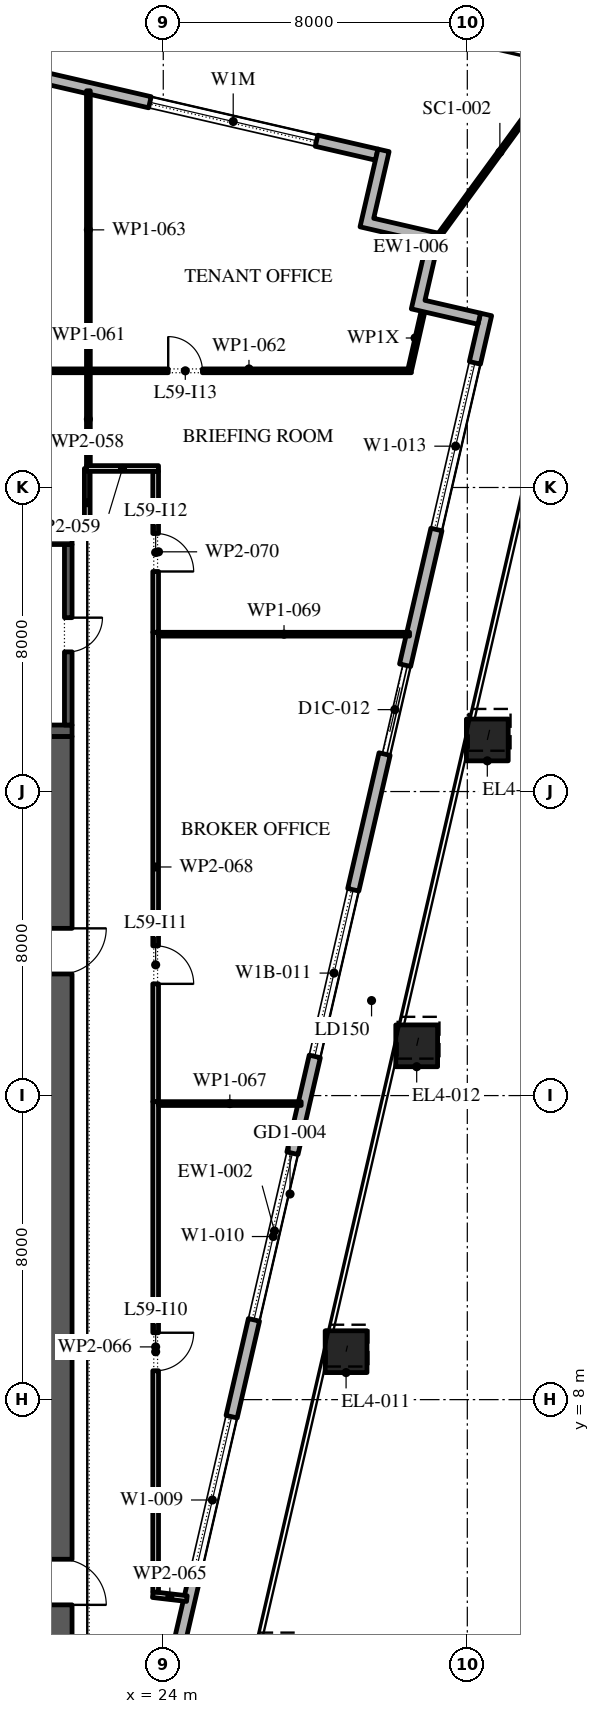
"""IFC4 building model, lengths in metres.
Left out: names, types, materials, properties, quantities, classifications, styles, units other than length and angle.
Written with IfcOpenShell. Run it as: python <this file> out.ifc"""

import sys

from ifc_helpers import new_model, si_unit, direction, frame, frame_2d, origin, origin_2d, place, context, subcontext, project, spatial, polyline, rectangle, outline, extrude, element, fill, save


model = new_model("IFC4")
c1 = context("Model", 3, precision=1e-05, world=origin(), true_north=direction((0.0, 1.0)))
c2 = subcontext(c1, "Body", "Model", "MODEL_VIEW")
j1 = project(units=[si_unit("LENGTHUNIT", "METRE"), si_unit("PLANEANGLEUNIT", "RADIAN")], contexts=[c1])
p1 = place(None, origin())
s1 = spatial("IfcSite", under=j1, at=p1, CompositionType="ELEMENT")
p2 = place(p1, origin())
s2 = spatial("IfcBuilding", under=s1, at=p2, CompositionType="ELEMENT")
p3 = place(p2, frame((0.0, 0.0, 272.4)))
s3 = spatial("IfcBuildingStorey", under=s2, at=p3, CompositionType="ELEMENT", Elevation=272.4)
p4 = place(p3, frame((26.952, 1.213, 0.0), z_axis=(0.005868742296, 0.025334372683, 0.999661806525), x_axis=(-0.974202561131, 0.225675363932, 0.0)))
e1 = element("IfcColumn", 1, at=p4, inside=s3, PredefinedType="COLUMN", context=c2, shape_type="SweptSolid", body=[
    extrude(rectangle(XDim=1.1, YDim=1.1, at=origin_2d()), origin(), (0.0, 0.0, 1.0), 4.202),
])
p5 = place(p3, frame((28.81, 9.262, 0.0), z_axis=(0.008712317294, 0.037869539172, 0.999244711535), x_axis=(-0.974542124643, 0.224204476528, 0.0)))
e2 = element("IfcColumn", 2, at=p5, inside=s3, PredefinedType="COLUMN", context=c2, shape_type="SweptSolid", body=[
    extrude(rectangle(XDim=1.1, YDim=1.1, at=origin_2d()), origin(), (0.0, 0.0, 1.0), 4.203),
])
p6 = place(p3, frame((30.668, 17.31, 0.0), z_axis=(0.011667590749, 0.050559559912, 0.998652891764), x_axis=(-0.974391195695, 0.224859506699, 0.0)))
e3 = element("IfcColumn", 3, at=p6, inside=s3, PredefinedType="COLUMN", context=c2, shape_type="SweptSolid", body=[
    extrude(rectangle(XDim=1.1, YDim=1.1, at=origin_2d()), origin(), (0.0, 0.0, 1.0), 4.206),
])
p7 = place(p3, frame((32.526, 25.358, 0.0), z_axis=(0.014558999143, 0.063108330945, 0.997900483069), x_axis=(-0.97440628778, 0.224794097641, 0.0)))
e4 = element("IfcColumn", 4, at=p7, inside=s3, PredefinedType="COLUMN", context=c2, shape_type="SweptSolid", body=[
    extrude(rectangle(XDim=1.1, YDim=1.1, at=origin_2d()), origin(), (0.0, 0.0, 1.0), 4.209),
])
p8 = place(p3, frame((21.359, -11.678, 0.0), z_axis=(0.0, 0.0, 1.0), x_axis=(0.224949198343, 0.974370493275, 0.0)))
e5 = element("IfcWall", 5, at=p8, inside=s3, PredefinedType="STANDARD", context=c2, shape_type="SweptSolid", body=[
    extrude(rectangle(XDim=49.5, YDim=0.3, at=frame_2d((24.75, 0.0))), origin(), (0.0, 0.0, 1.0), 4.0),
])
p9 = place(p8, frame((1.157, 0.0, 0.45)))
e6 = element("IfcOpeningElement", 6, at=p9, cuts=e5, PredefinedType="OPENING", context=c2, shape_type="SweptSolid", body=[
    extrude(rectangle(XDim=4.5, YDim=3.05, at=frame_2d((2.25, 1.525))), frame((0.0, 0.16, 0.0), z_axis=(0.0, -1.0, 0.0), x_axis=(1.0, 0.0, 0.0)), (0.0, 0.0, 1.0), 0.32),
])
p10 = place(p8, frame((8.121, 0.0, 0.45)))
e7 = element("IfcOpeningElement", 7, at=p10, cuts=e5, PredefinedType="OPENING", context=c2, shape_type="SweptSolid", body=[
    extrude(rectangle(XDim=4.5, YDim=3.05, at=frame_2d((2.25, 1.525))), frame((0.0, 0.16, 0.0), z_axis=(0.0, -1.0, 0.0), x_axis=(1.0, 0.0, 0.0)), (0.0, 0.0, 1.0), 0.32),
])
p11 = place(p8, frame((15.236, 0.0, 0.45)))
e8 = element("IfcOpeningElement", 8, at=p11, cuts=e5, PredefinedType="OPENING", context=c2, shape_type="SweptSolid", body=[
    extrude(rectangle(XDim=4.5, YDim=3.05, at=frame_2d((2.25, 1.525))), frame((0.0, 0.16, 0.0), z_axis=(0.0, -1.0, 0.0), x_axis=(1.0, 0.0, 0.0)), (0.0, 0.0, 1.0), 0.32),
])
p12 = place(p8, frame((22.35, 0.0, 0.45)))
e9 = element("IfcOpeningElement", 9, at=p12, cuts=e5, PredefinedType="OPENING", context=c2, shape_type="SweptSolid", body=[
    extrude(rectangle(XDim=4.5, YDim=3.05, at=frame_2d((2.25, 1.525))), frame((0.0, 0.16, 0.0), z_axis=(0.0, -1.0, 0.0), x_axis=(1.0, 0.0, 0.0)), (0.0, 0.0, 1.0), 0.32),
])
p13 = place(p8, frame((29.464, 0.0, 0.45)))
e10 = element("IfcOpeningElement", 10, at=p13, cuts=e5, PredefinedType="OPENING", context=c2, shape_type="SweptSolid", body=[
    extrude(rectangle(XDim=4.5, YDim=2.95, at=frame_2d((2.25, 1.475))), frame((0.0, 0.16, 0.0), z_axis=(0.0, -1.0, 0.0), x_axis=(1.0, 0.0, 0.0)), (0.0, 0.0, 1.0), 0.32),
])
p14 = place(p8, frame((37.628, 0.0, 0.0)))
e11 = element("IfcOpeningElement", 11, at=p14, cuts=e5, PredefinedType="OPENING", context=c2, shape_type="SweptSolid", body=[
    extrude(rectangle(XDim=2.4, YDim=3.325, at=frame_2d((1.2, 1.663))), frame((0.0, 0.16, 0.0), z_axis=(0.0, -1.0, 0.0), x_axis=(1.0, 0.0, 0.0)), (0.0, 0.0, 1.0), 0.32),
])
p15 = place(p8, frame((43.693, 0.0, 0.45)))
e12 = element("IfcOpeningElement", 12, at=p15, cuts=e5, PredefinedType="OPENING", context=c2, shape_type="SweptSolid", body=[
    extrude(rectangle(XDim=4.5, YDim=3.05, at=frame_2d((2.25, 1.525))), frame((0.0, 0.16, 0.0), z_axis=(0.0, -1.0, 0.0), x_axis=(1.0, 0.0, 0.0)), (0.0, 0.0, 1.0), 0.32),
])
p16 = place(p3, frame((29.616, 40.758, 0.0), z_axis=(0.0, 0.0, 1.0), x_axis=(-0.974370532314, 0.224949029246, 0.0)))
e13 = element("IfcWall", 13, at=p16, inside=s3, PredefinedType="STANDARD", context=c2, shape_type="SweptSolid", body=[
    extrude(rectangle(XDim=48.0, YDim=0.3, at=frame_2d((24.0, 0.0))), origin(), (0.0, 0.0, 1.0), 4.0),
])
p17 = place(p16, frame((1.625, 0.0, 0.45)))
e14 = element("IfcOpeningElement", 14, at=p17, cuts=e13, PredefinedType="OPENING", context=c2, shape_type="SweptSolid", body=[
    extrude(rectangle(XDim=4.5, YDim=2.575, at=frame_2d((2.25, 1.288))), frame((0.0, 0.16, 0.0), z_axis=(0.0, -1.0, 0.0), x_axis=(1.0, 0.0, 0.0)), (0.0, 0.0, 1.0), 0.32),
])
p18 = place(p16, frame((10.575, 0.0, 0.0)))
e15 = element("IfcOpeningElement", 15, at=p18, cuts=e13, PredefinedType="OPENING", context=c2, shape_type="SweptSolid", body=[
    extrude(rectangle(XDim=2.4, YDim=3.5, at=frame_2d((1.2, 1.75))), frame((0.0, 0.16, 0.0), z_axis=(0.0, -1.0, 0.0), x_axis=(1.0, 0.0, 0.0)), (0.0, 0.0, 1.0), 0.32),
])
p19 = place(p16, frame((17.575, 0.0, 0.45)))
e16 = element("IfcOpeningElement", 16, at=p19, cuts=e13, PredefinedType="OPENING", context=c2, shape_type="SweptSolid", body=[
    extrude(rectangle(XDim=4.5, YDim=2.45, at=frame_2d((2.25, 1.225))), frame((0.0, 0.16, 0.0), z_axis=(0.0, -1.0, 0.0), x_axis=(1.0, 0.0, 0.0)), (0.0, 0.0, 1.0), 0.32),
])
p20 = place(p16, frame((25.625, 0.0, 0.45)))
e17 = element("IfcOpeningElement", 17, at=p20, cuts=e13, PredefinedType="OPENING", context=c2, shape_type="SweptSolid", body=[
    extrude(rectangle(XDim=4.5, YDim=2.45, at=frame_2d((2.25, 1.225))), frame((0.0, 0.16, 0.0), z_axis=(0.0, -1.0, 0.0), x_axis=(1.0, 0.0, 0.0)), (0.0, 0.0, 1.0), 0.32),
])
p21 = place(p16, frame((33.675, 0.0, 0.45)))
e18 = element("IfcOpeningElement", 18, at=p21, cuts=e13, PredefinedType="OPENING", context=c2, shape_type="SweptSolid", body=[
    extrude(rectangle(XDim=4.5, YDim=2.45, at=frame_2d((2.25, 1.225))), frame((0.0, 0.16, 0.0), z_axis=(0.0, -1.0, 0.0), x_axis=(1.0, 0.0, 0.0)), (0.0, 0.0, 1.0), 0.32),
])
p22 = place(p16, frame((42.175, 0.0, 0.0)))
e19 = element("IfcOpeningElement", 19, at=p22, cuts=e13, PredefinedType="OPENING", context=c2, shape_type="SweptSolid", body=[
    extrude(rectangle(XDim=2.4, YDim=3.5, at=frame_2d((1.2, 1.75))), frame((0.0, 0.16, 0.0), z_axis=(0.0, -1.0, 0.0), x_axis=(1.0, 0.0, 0.0)), (0.0, 0.0, 1.0), 0.32),
])
p23 = place(p3, origin())
e20 = element("IfcWall", 20, at=p23, inside=s3, PredefinedType="STANDARD", context=c2, shape_type="SweptSolid", body=[
    extrude(outline(polyline([(30.931, 38.453), (29.177, 38.858), (29.65, 40.905), (29.942, 40.837), (29.537, 39.083), (31.291, 38.678), (30.886, 36.924), (32.348, 36.587), (32.28, 36.295), (30.526, 36.699), (30.931, 38.453)])), origin(), (0.0, 0.0, 1.0), 4.0),
])
p24 = place(p3, frame((31.291, 38.678, -0.05), z_axis=(0.0, 0.0, 1.0), x_axis=(0.589676569324, 0.807639488627, 0.0)))
e21 = element("IfcWall", 21, at=p24, inside=s3, PredefinedType="STANDARD", context=c2, shape_type="SweptSolid", body=[
    extrude(rectangle(XDim=5.312, YDim=0.1, at=frame_2d((2.656, 0.0))), origin(), (0.0, 0.0, 1.0), 4.05),
])
p25 = place(p3, frame((21.3, -2.45, 0.0), z_axis=(0.0, 0.0, 1.0), x_axis=(0.0, 1.0, 0.0)))
e22 = element("IfcWall", 22, at=p25, inside=s3, PredefinedType="SHEAR", context=c2, shape_type="SweptSolid", body=[
    extrude(rectangle(XDim=27.9, YDim=0.6, at=frame_2d((13.95, 0.0))), origin(), (0.0, 0.0, 1.0), 4.0),
])
p26 = place(p25, frame((5.05, 0.0, 0.0)))
e23 = element("IfcOpeningElement", 23, at=p26, cuts=e22, PredefinedType="OPENING", context=c2, shape_type="SweptSolid", body=[
    extrude(rectangle(XDim=1.2, YDim=2.1, at=frame_2d((0.6, 1.05))), frame((0.0, 0.31, 0.0), z_axis=(0.0, -1.0, 0.0), x_axis=(1.0, 0.0, 0.0)), (0.0, 0.0, 1.0), 0.62),
])
p27 = place(p25, frame((21.65, 0.0, 0.0)))
e24 = element("IfcOpeningElement", 24, at=p27, cuts=e22, PredefinedType="OPENING", context=c2, shape_type="SweptSolid", body=[
    extrude(rectangle(XDim=1.2, YDim=2.1, at=frame_2d((0.6, 1.05))), frame((0.0, 0.31, 0.0), z_axis=(0.0, -1.0, 0.0), x_axis=(1.0, 0.0, 0.0)), (0.0, 0.0, 1.0), 0.62),
])
p28 = place(p3, frame((10.4, 25.6, 0.0), z_axis=(0.0, 0.0, 1.0), x_axis=(1.0, 0.0, 0.0)))
e25 = element("IfcWall", 25, at=p28, inside=s3, PredefinedType="SHEAR", context=c2, shape_type="SweptSolid", body=[
    extrude(rectangle(XDim=11.2, YDim=0.3, at=frame_2d((5.6, 0.0))), origin(), (0.0, 0.0, 1.0), 4.0),
])
p29 = place(p3, frame((21.5, 25.75, 0.0), z_axis=(0.0, 0.0, 1.0), x_axis=(0.0, 1.0, 0.0)))
e26 = element("IfcWall", 26, at=p29, inside=s3, PredefinedType="SHEAR", context=c2, shape_type="SweptSolid", body=[
    extrude(rectangle(XDim=4.75, YDim=0.2, at=frame_2d((2.375, 0.0))), origin(), (0.0, 0.0, 1.0), 4.0),
])
p30 = place(p29, frame((1.925, 0.0, 0.0)))
e27 = element("IfcOpeningElement", 27, at=p30, cuts=e26, PredefinedType="OPENING", context=c2, shape_type="SweptSolid", body=[
    extrude(rectangle(XDim=0.9, YDim=2.1, at=frame_2d((0.45, 1.05))), frame((0.0, 0.11, 0.0), z_axis=(0.0, -1.0, 0.0), x_axis=(1.0, 0.0, 0.0)), (0.0, 0.0, 1.0), 0.22),
])
p31 = place(p3, frame((10.4, 30.6, 0.0), z_axis=(0.0, 0.0, 1.0), x_axis=(1.0, 0.0, 0.0)))
e28 = element("IfcWall", 28, at=p31, inside=s3, PredefinedType="SHEAR", context=c2, shape_type="SweptSolid", body=[
    extrude(rectangle(XDim=11.2, YDim=0.2, at=frame_2d((5.6, 0.0))), origin(), (0.0, 0.0, 1.0), 4.0),
])
p32 = place(p3, frame((22.0, 30.7, 0.0), z_axis=(0.0, 0.0, 1.0), x_axis=(0.0, 1.0, 0.0)))
e29 = element("IfcWall", 29, at=p32, inside=s3, PredefinedType="PARTITIONING", context=c2, shape_type="SweptSolid", body=[
    extrude(rectangle(XDim=1.8, YDim=0.15, at=frame_2d((0.9, 0.0))), origin(), (0.0, 0.0, 1.0), 4.0),
])
p33 = place(p3, frame((21.98, 32.5, 0.0), z_axis=(0.0, 0.0, 1.0), x_axis=(1.0, 0.0, 0.0)))
e30 = element("IfcWall", 30, at=p33, inside=s3, PredefinedType="PARTITIONING", context=c2, shape_type="SweptSolid", body=[
    extrude(rectangle(XDim=1.895, YDim=0.15, at=frame_2d((0.948, 0.0))), origin(), (0.0, 0.0, 1.0), 4.0),
])
p34 = place(p3, frame((21.98, 35.07, 0.0), z_axis=(0.0, 0.0, 1.0), x_axis=(-1.0, 0.0, 0.0)))
e31 = element("IfcWall", 31, at=p34, inside=s3, PredefinedType="PARTITIONING", context=c2, shape_type="SweptSolid", body=[
    extrude(rectangle(XDim=7.79, YDim=0.1, at=frame_2d((3.895, 0.0))), origin(), (0.0, 0.0, 1.0), 4.0),
])
p35 = place(p3, frame((22.03, 35.02, 0.0), z_axis=(0.0, 0.0, 1.0), x_axis=(0.0, -1.0, 0.0)))
e32 = element("IfcWall", 32, at=p35, inside=s3, PredefinedType="PARTITIONING", context=c2, shape_type="SweptSolid", body=[
    extrude(rectangle(XDim=2.445, YDim=0.1, at=frame_2d((1.223, 0.0))), origin(), (0.0, 0.0, 1.0), 4.0),
])
p36 = place(p3, frame((21.98, 35.07, 0.0), z_axis=(0.0, 0.0, 1.0), x_axis=(1.0, 0.0, 0.0)))
e33 = element("IfcWall", 33, at=p36, inside=s3, PredefinedType="PARTITIONING", context=c2, shape_type="SweptSolid", body=[
    extrude(rectangle(XDim=8.55, YDim=0.1, at=frame_2d((4.275, 0.0))), origin(), (0.0, 0.0, 1.0), 4.0),
])
p37 = place(p36, frame((2.15, 0.0, 0.0)))
e34 = element("IfcOpeningElement", 34, at=p37, cuts=e33, PredefinedType="OPENING", context=c2, shape_type="SweptSolid", body=[
    extrude(rectangle(XDim=0.9, YDim=2.1, at=frame_2d((0.45, 1.05))), frame((0.0, 0.06, 0.0), z_axis=(0.0, -1.0, 0.0), x_axis=(1.0, 0.0, 0.0)), (0.0, 0.0, 1.0), 0.12),
])
p38 = place(p3, frame((22.03, 42.438, 0.0), z_axis=(0.0, 0.0, 1.0), x_axis=(0.0, -1.0, 0.0)))
e35 = element("IfcWall", 35, at=p38, inside=s3, PredefinedType="PARTITIONING", context=c2, shape_type="SweptSolid", body=[
    extrude(rectangle(XDim=7.318, YDim=0.1, at=frame_2d((3.659, 0.0))), origin(), (0.0, 0.0, 1.0), 4.0),
])
p39 = place(p3, frame((23.725, 2.869, 0.0), z_axis=(0.0, 0.0, 1.0), x_axis=(0.993330469257, -0.115302119865, 0.0)))
e36 = element("IfcWall", 36, at=p39, inside=s3, PredefinedType="PARTITIONING", context=c2, shape_type="SweptSolid", body=[
    extrude(rectangle(XDim=0.902, YDim=0.15, at=frame_2d((0.451, 0.0))), origin(), (0.0, 0.0, 1.0), 4.0),
])
p40 = place(p3, frame((23.8, 15.84, 0.0), z_axis=(0.0, 0.0, 1.0), x_axis=(0.0, -1.0, 0.0)))
e37 = element("IfcWall", 37, at=p40, inside=s3, PredefinedType="PARTITIONING", context=c2, shape_type="SweptSolid", body=[
    extrude(rectangle(XDim=12.905, YDim=0.15, at=frame_2d((6.453, 0.0))), origin(), (0.0, 0.0, 1.0), 4.0),
])
p41 = place(p40, frame((6.08, 0.0, 0.0)))
e38 = element("IfcOpeningElement", 38, at=p41, cuts=e37, PredefinedType="OPENING", context=c2, shape_type="SweptSolid", body=[
    extrude(rectangle(XDim=1.0, YDim=2.1, at=frame_2d((0.5, 1.05))), frame((0.0, 0.085, 0.0), z_axis=(0.0, -1.0, 0.0), x_axis=(1.0, 0.0, 0.0)), (0.0, 0.0, 1.0), 0.17),
])
p42 = place(p3, frame((23.875, 15.79, 0.0), z_axis=(0.0, 0.0, 1.0), x_axis=(1.0, 0.0, 0.0)))
e39 = element("IfcWall", 39, at=p42, inside=s3, PredefinedType="PARTITIONING", context=c2, shape_type="SweptSolid", body=[
    extrude(rectangle(XDim=3.754, YDim=0.1, at=frame_2d((1.877, 0.0))), origin(), (0.0, 0.0, 1.0), 4.0),
])
p43 = place(p3, frame((23.8, 28.19, 0.0), z_axis=(0.0, 0.0, 1.0), x_axis=(0.0, -1.0, 0.0)))
e40 = element("IfcWall", 40, at=p43, inside=s3, PredefinedType="PARTITIONING", context=c2, shape_type="SweptSolid", body=[
    extrude(rectangle(XDim=12.35, YDim=0.15, at=frame_2d((6.175, 0.0))), origin(), (0.0, 0.0, 1.0), 4.0),
])
p44 = place(p43, frame((8.25, 0.0, 0.0)))
e41 = element("IfcOpeningElement", 41, at=p44, cuts=e40, PredefinedType="OPENING", context=c2, shape_type="SweptSolid", body=[
    extrude(rectangle(XDim=1.0, YDim=2.1, at=frame_2d((0.5, 1.05))), frame((0.0, 0.085, 0.0), z_axis=(0.0, -1.0, 0.0), x_axis=(1.0, 0.0, 0.0)), (0.0, 0.0, 1.0), 0.17),
])
p45 = place(p3, frame((23.875, 28.14, 0.0), z_axis=(0.0, 0.0, 1.0), x_axis=(1.0, 0.0, 0.0)))
e42 = element("IfcWall", 42, at=p45, inside=s3, PredefinedType="PARTITIONING", context=c2, shape_type="SweptSolid", body=[
    extrude(rectangle(XDim=6.605, YDim=0.1, at=frame_2d((3.302, 0.0))), origin(), (0.0, 0.0, 1.0), 4.0),
])
p46 = place(p3, frame((23.8, 32.425, 0.0), z_axis=(0.0, 0.0, 1.0), x_axis=(0.0, -1.0, 0.0)))
e43 = element("IfcWall", 43, at=p46, inside=s3, PredefinedType="PARTITIONING", context=c2, shape_type="SweptSolid", body=[
    extrude(rectangle(XDim=4.235, YDim=0.15, at=frame_2d((2.118, 0.0))), origin(), (0.0, 0.0, 1.0), 4.0),
])
p47 = place(p46, frame((1.635, 0.0, 0.0)))
e44 = element("IfcOpeningElement", 44, at=p47, cuts=e43, PredefinedType="OPENING", context=c2, shape_type="SweptSolid", body=[
    extrude(rectangle(XDim=1.0, YDim=2.1, at=frame_2d((0.5, 1.05))), frame((0.0, 0.085, 0.0), z_axis=(0.0, -1.0, 0.0), x_axis=(1.0, 0.0, 0.0)), (0.0, 0.0, 1.0), 0.17),
])
p48 = place(p3, frame((30.491, 35.119, 0.0), z_axis=(0.0, 0.0, 1.0), x_axis=(0.221461033886, 0.975169221453, 0.0)))
e45 = element("IfcWall", 45, at=p48, inside=s3, PredefinedType="PARTITIONING", context=c2, shape_type="SweptSolid", body=[
    extrude(rectangle(XDim=1.648, YDim=0.1, at=frame_2d((0.824, 0.0))), origin(), (0.0, 0.0, 1.0), 3.246),
])
p49 = place(p11, origin())
e46 = element("IfcWindow", 46, at=p49, inside=s3, PartitioningType="DOUBLE_PANEL_VERTICAL", PredefinedType="WINDOW", context=c2, shape_type="SweptSolid", body=[
    extrude(rectangle(XDim=4.5, YDim=3.05, at=frame_2d((2.25, 1.525))), frame((0.0, 0.03, 0.0), z_axis=(0.0, -1.0, 0.0), x_axis=(1.0, 0.0, 0.0)), (0.0, 0.0, 1.0), 0.06),
])
fill(e8, e46)
p50 = place(p12, origin())
e47 = element("IfcWindow", 47, at=p50, inside=s3, PartitioningType="DOUBLE_PANEL_VERTICAL", PredefinedType="WINDOW", context=c2, shape_type="SweptSolid", body=[
    extrude(rectangle(XDim=4.5, YDim=3.05, at=frame_2d((2.25, 1.525))), frame((0.0, 0.03, 0.0), z_axis=(0.0, -1.0, 0.0), x_axis=(1.0, 0.0, 0.0)), (0.0, 0.0, 1.0), 0.06),
])
fill(e9, e47)
p51 = place(p13, origin())
e48 = element("IfcWindow", 48, at=p51, inside=s3, PartitioningType="DOUBLE_PANEL_VERTICAL", PredefinedType="WINDOW", context=c2, shape_type="SweptSolid", body=[
    extrude(rectangle(XDim=4.5, YDim=2.95, at=frame_2d((2.25, 1.475))), frame((0.0, 0.03, 0.0), z_axis=(0.0, -1.0, 0.0), x_axis=(1.0, 0.0, 0.0)), (0.0, 0.0, 1.0), 0.06),
])
fill(e10, e48)
p52 = place(p14, origin())
e49 = element("IfcDoor", 49, at=p52, inside=s3, OperationType="DOUBLE_DOOR_SLIDING", PredefinedType="DOOR", context=c2, shape_type="SweptSolid", body=[
    extrude(rectangle(XDim=2.4, YDim=3.325, at=frame_2d((1.2, 1.663))), frame((0.0, 0.025, 0.0), z_axis=(0.0, -1.0, 0.0), x_axis=(1.0, 0.0, 0.0)), (0.0, 0.0, 1.0), 0.05),
])
fill(e11, e49)
p53 = place(p15, origin())
e50 = element("IfcWindow", 50, at=p53, inside=s3, PartitioningType="DOUBLE_PANEL_VERTICAL", PredefinedType="WINDOW", context=c2, shape_type="SweptSolid", body=[
    extrude(rectangle(XDim=4.5, YDim=3.05, at=frame_2d((2.25, 1.525))), frame((0.0, 0.03, 0.0), z_axis=(0.0, -1.0, 0.0), x_axis=(1.0, 0.0, 0.0)), (0.0, 0.0, 1.0), 0.06),
])
fill(e12, e50)
p54 = place(p17, origin())
e51 = element("IfcWindow", 51, at=p54, inside=s3, PartitioningType="DOUBLE_PANEL_VERTICAL", PredefinedType="WINDOW", context=c2, shape_type="SweptSolid", body=[
    extrude(rectangle(XDim=4.5, YDim=2.575, at=frame_2d((2.25, 1.288))), frame((0.0, 0.03, 0.0), z_axis=(0.0, -1.0, 0.0), x_axis=(1.0, 0.0, 0.0)), (0.0, 0.0, 1.0), 0.06),
])
fill(e14, e51)
p55 = place(p26, frame((1.2, 0.0, 0.0), z_axis=(0.0, 0.0, 1.0), x_axis=(-1.0, 0.0, 0.0)))
e52 = element("IfcDoor", 52, at=p55, inside=s3, OperationType="SINGLE_SWING_LEFT", PredefinedType="DOOR", context=c2, shape_type="SweptSolid", body=[
    extrude(rectangle(XDim=1.2, YDim=2.1, at=frame_2d((0.6, 1.05))), frame((0.0, 0.025, 0.0), z_axis=(0.0, -1.0, 0.0), x_axis=(1.0, 0.0, 0.0)), (0.0, 0.0, 1.0), 0.05),
])
fill(e23, e52)
p56 = place(p27, frame((1.2, 0.0, 0.0), z_axis=(0.0, 0.0, 1.0), x_axis=(-1.0, 0.0, 0.0)))
e53 = element("IfcDoor", 53, at=p56, inside=s3, OperationType="SINGLE_SWING_RIGHT", PredefinedType="DOOR", context=c2, shape_type="SweptSolid", body=[
    extrude(rectangle(XDim=1.2, YDim=2.1, at=frame_2d((0.6, 1.05))), frame((0.0, 0.025, 0.0), z_axis=(0.0, -1.0, 0.0), x_axis=(1.0, 0.0, 0.0)), (0.0, 0.0, 1.0), 0.05),
])
fill(e24, e53)
p57 = place(p30, frame((0.9, 0.15, 0.0), z_axis=(0.0, 0.0, 1.0), x_axis=(-1.0, 0.0, 0.0)))
e54 = element("IfcDoor", 54, at=p57, inside=s3, OperationType="SINGLE_SWING_RIGHT", PredefinedType="DOOR", context=c2, shape_type="SweptSolid", body=[
    extrude(rectangle(XDim=0.9, YDim=2.1, at=frame_2d((0.45, 1.05))), frame((0.0, 0.1, 0.0), z_axis=(0.0, -1.0, 0.0), x_axis=(1.0, 0.0, 0.0)), (0.0, 0.0, 1.0), 0.05),
])
fill(e27, e54)
p58 = place(p41, origin())
e55 = element("IfcDoor", 55, at=p58, inside=s3, OperationType="SINGLE_SWING_RIGHT", PredefinedType="DOOR", context=c2, shape_type="SweptSolid", body=[
    extrude(rectangle(XDim=1.0, YDim=2.1, at=frame_2d((0.5, 1.05))), frame((0.0, 0.025, 0.0), z_axis=(0.0, -1.0, 0.0), x_axis=(1.0, 0.0, 0.0)), (0.0, 0.0, 1.0), 0.05),
])
fill(e38, e55)
p59 = place(p44, origin())
e56 = element("IfcDoor", 56, at=p59, inside=s3, OperationType="SINGLE_SWING_LEFT", PredefinedType="DOOR", context=c2, shape_type="SweptSolid", body=[
    extrude(rectangle(XDim=1.0, YDim=2.1, at=frame_2d((0.5, 1.05))), frame((0.0, 0.025, 0.0), z_axis=(0.0, -1.0, 0.0), x_axis=(1.0, 0.0, 0.0)), (0.0, 0.0, 1.0), 0.05),
])
fill(e41, e56)
p60 = place(p47, origin())
e57 = element("IfcDoor", 57, at=p60, inside=s3, OperationType="SINGLE_SWING_LEFT", PredefinedType="DOOR", context=c2, shape_type="SweptSolid", body=[
    extrude(rectangle(XDim=1.0, YDim=2.1, at=frame_2d((0.5, 1.05))), frame((0.0, 0.025, 0.0), z_axis=(0.0, -1.0, 0.0), x_axis=(1.0, 0.0, 0.0)), (0.0, 0.0, 1.0), 0.05),
])
fill(e44, e57)
p61 = place(p37, origin())
e58 = element("IfcDoor", 58, at=p61, inside=s3, OperationType="SINGLE_SWING_RIGHT", PredefinedType="DOOR", context=c2, shape_type="SweptSolid", body=[
    extrude(rectangle(XDim=0.9, YDim=2.1, at=frame_2d((0.45, 1.05))), frame((0.0, 0.025, 0.0), z_axis=(0.0, -1.0, 0.0), x_axis=(1.0, 0.0, 0.0)), (0.0, 0.0, 1.0), 0.05),
])
fill(e34, e58)
save(model, sys.argv[1])
